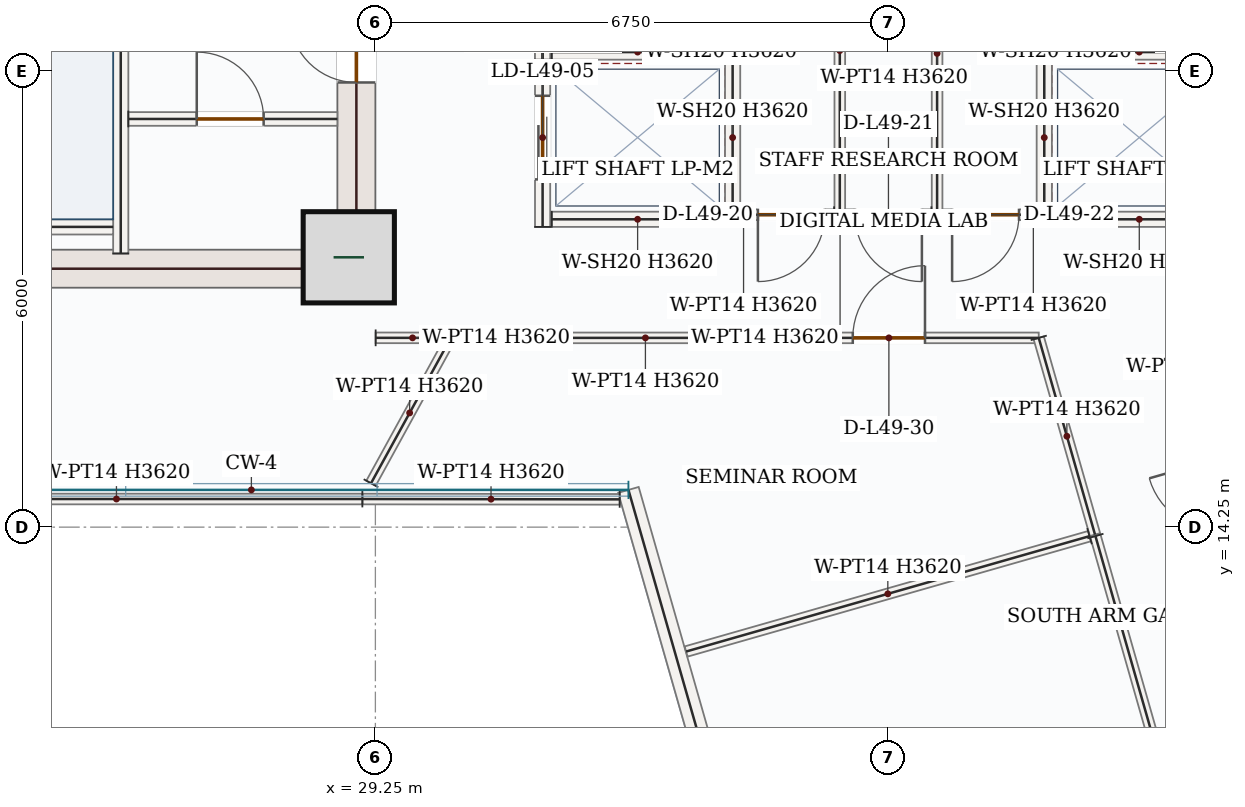
"""IFC4 building model, lengths in metres.
Left out: names, types, materials, properties, quantities, classifications, styles, units other than length and angle.
Written with IfcOpenShell. Run it as: python <this file> out.ifc"""

import sys

from ifc_helpers import new_model, si_unit, direction, frame, frame_2d, origin, origin_2d, place, context, subcontext, project, spatial, rectangle, extrude, source, transform, mapped, element, fill, save


model = new_model("IFC4")
c1 = context("Model", 3, precision=1e-05, world=origin(), true_north=direction((0.0, 1.0)))
c2 = subcontext(c1, "Body", "Model", "MODEL_VIEW")
j1 = project(units=[si_unit("LENGTHUNIT", "METRE"), si_unit("PLANEANGLEUNIT", "RADIAN")], contexts=[c1])
p1 = place(None, origin())
s1 = spatial("IfcSite", under=j1, at=p1, CompositionType="ELEMENT")
p2 = place(p1, origin())
s2 = spatial("IfcBuilding", under=s1, at=p2, CompositionType="ELEMENT")
p3 = place(p2, frame((0.0, 0.0, 209.7)))
s3 = spatial("IfcBuildingStorey", under=s2, at=p3, CompositionType="ELEMENT", Elevation=209.7)
p4 = place(p3, frame((29.0, 17.4, 0.0), z_axis=(0.0, 0.0, 1.0), x_axis=(0.0, 1.0, 0.0)))
e1 = element("IfcWall", 1, at=p4, inside=s3, PredefinedType="SHEAR", context=c2, shape_type="SweptSolid", body=[
    extrude(rectangle(XDim=8.55, YDim=0.5, at=frame_2d((4.275, 0.0))), origin(), (0.0, 0.0, 1.0), 3.62),
])
p5 = place(p4, frame((6.65, 0.0, 0.0)))
e2 = element("IfcOpeningElement", 2, at=p5, cuts=e1, PredefinedType="OPENING", context=c2, shape_type="SweptSolid", body=[
    extrude(rectangle(XDim=1.1, YDim=2.2, at=frame_2d((0.55, 1.1))), frame((0.0, 0.26, 0.0), z_axis=(0.0, -1.0, 0.0), x_axis=(1.0, 0.0, 0.0)), (0.0, 0.0, 1.0), 0.52),
])
p6 = place(p4, frame((2.7, 0.0, 0.0)))
e3 = element("IfcOpeningElement", 3, at=p6, cuts=e1, PredefinedType="OPENING", context=c2, shape_type="SweptSolid", body=[
    extrude(rectangle(XDim=0.88, YDim=2.1, at=frame_2d((0.44, 1.05))), frame((0.0, 0.26, 0.0), z_axis=(0.0, -1.0, 0.0), x_axis=(1.0, 0.0, 0.0)), (0.0, 0.0, 1.0), 0.52),
])
p7 = place(p4, frame((4.6, 0.0, 0.0)))
e4 = element("IfcOpeningElement", 4, at=p7, cuts=e1, PredefinedType="OPENING", context=c2, shape_type="SweptSolid", body=[
    extrude(rectangle(XDim=0.88, YDim=2.1, at=frame_2d((0.44, 1.05))), frame((0.0, 0.26, 0.0), z_axis=(0.0, -1.0, 0.0), x_axis=(1.0, 0.0, 0.0)), (0.0, 0.0, 1.0), 0.52),
])
m1 = source(origin(), c2, "Body", "SweptSolid", [
    extrude(rectangle(XDim=7.0, YDim=0.5, at=frame_2d((3.5, 0.0))), origin(), (0.0, 0.0, 1.0), 3.62),
])
p8 = place(p3, frame((21.75, 17.65, 0.0), z_axis=(0.0, 0.0, 1.0), x_axis=(1.0, 0.0, 0.0)))
e5 = element("IfcWall", 5, at=p8, inside=s3, PredefinedType="SHEAR", context=c2, shape_type="MappedRepresentation", body=[
    mapped(m1, transform((0.0, 0.0, 0.0), x_axis=(1.0, 0.0, 0.0), y_axis=(0.0, 1.0, 0.0), z_axis=(0.0, 0.0, 1.0), scale=1.0)),
])
m2 = source(origin(), c2, "Body", "SweptSolid", [
    extrude(rectangle(XDim=1.2, YDim=1.2, at=origin_2d()), origin(), (0.0, 0.0, 1.0), 3.9),
])
p9 = place(p3, frame((28.9, 17.8, 0.0), z_axis=(0.0, 0.0, 1.0), x_axis=(1.0, 0.0, 0.0)))
e6 = element("IfcColumn", 6, at=p9, inside=s3, PredefinedType="COLUMN", context=c2, shape_type="MappedRepresentation", body=[
    mapped(m2, transform((0.0, 0.0, 0.0), x_axis=(1.0, 0.0, 0.0), y_axis=(0.0, 1.0, 0.0), z_axis=(0.0, 0.0, 1.0), scale=1.0)),
])
p10 = place(p3, frame((34.92, 6.555, 0.0), z_axis=(0.0, 0.0, 1.0), x_axis=(-0.27496352843, 0.961454657295, 0.0)))
e7 = element("IfcWall", 7, at=p10, inside=s3, PredefinedType="SOLIDWALL", context=c2, shape_type="SweptSolid", body=[
    extrude(rectangle(XDim=8.513, YDim=0.28, at=frame_2d((4.257, 0.0))), origin(), (0.0, 0.0, 1.0), 3.62),
])
p11 = place(p10, frame((3.357, 0.0, 0.85)))
e8 = element("IfcOpeningElement", 8, at=p11, cuts=e7, PredefinedType="OPENING", context=c2, shape_type="SweptSolid", body=[
    extrude(rectangle(XDim=1.8, YDim=1.75, at=frame_2d((0.9, 0.875))), frame((0.0, 0.15, 0.0), z_axis=(0.0, -1.0, 0.0), x_axis=(1.0, 0.0, 0.0)), (0.0, 0.0, 1.0), 0.3),
])
p12 = place(p3, frame((25.9, 17.85, 0.0), z_axis=(0.0, 0.0, 1.0), x_axis=(0.0, 1.0, 0.0)))
e9 = element("IfcWall", 9, at=p12, inside=s3, PredefinedType="SOLIDWALL", context=c2, shape_type="SweptSolid", body=[
    extrude(rectangle(XDim=8.0, YDim=0.2, at=frame_2d((4.0, 0.0))), origin(), (0.0, 0.0, 1.0), 3.62),
])
p13 = place(p12, frame((6.3, 0.0, 0.0)))
e10 = element("IfcOpeningElement", 10, at=p13, cuts=e9, PredefinedType="OPENING", context=c2, shape_type="SweptSolid", body=[
    extrude(rectangle(XDim=1.05, YDim=2.15, at=frame_2d((0.525, 1.075))), frame((0.0, 0.11, 0.0), z_axis=(0.0, -1.0, 0.0), x_axis=(1.0, 0.0, 0.0)), (0.0, 0.0, 1.0), 0.22),
])
m3 = source(origin(), c2, "Body", "SweptSolid", [
    extrude(rectangle(XDim=3.25, YDim=0.2, at=frame_2d((1.625, 0.0))), origin(), (0.0, 0.0, 1.0), 3.62),
])
p14 = place(p3, frame((22.55, 18.2, 0.0), z_axis=(0.0, 0.0, 1.0), x_axis=(1.0, 0.0, 0.0)))
e11 = element("IfcWall", 11, at=p14, inside=s3, PredefinedType="SOLIDWALL", context=c2, shape_type="MappedRepresentation", body=[
    mapped(m3, transform((0.0, 0.0, 0.0), x_axis=(1.0, 0.0, 0.0), y_axis=(0.0, 1.0, 0.0), z_axis=(0.0, 0.0, 1.0), scale=1.0)),
])
p15 = place(p3, frame((26.0, 19.62, 0.0), z_axis=(0.0, 0.0, 1.0), x_axis=(1.0, 0.0, 0.0)))
e12 = element("IfcWall", 12, at=p15, inside=s3, PredefinedType="PARTITIONING", context=c2, shape_type="SweptSolid", body=[
    extrude(rectangle(XDim=2.75, YDim=0.18, at=frame_2d((1.375, 0.0))), origin(), (0.0, 0.0, 1.0), 3.62),
])
p16 = place(p15, frame((0.9, 0.0, 0.0)))
e13 = element("IfcOpeningElement", 13, at=p16, cuts=e12, PredefinedType="OPENING", context=c2, shape_type="SweptSolid", body=[
    extrude(rectangle(XDim=0.88, YDim=2.1, at=frame_2d((0.44, 1.05))), frame((0.0, 0.1, 0.0), z_axis=(0.0, -1.0, 0.0), x_axis=(1.0, 0.0, 0.0)), (0.0, 0.0, 1.0), 0.2),
])
p17 = place(p3, frame((31.45, 20.4, 0.0), z_axis=(0.0, 0.0, 1.0), x_axis=(0.0, 1.0, 0.0)))
e14 = element("IfcWall", 14, at=p17, inside=s3, PredefinedType="SOLIDWALL", context=c2, shape_type="SweptSolid", body=[
    extrude(rectangle(XDim=2.35, YDim=0.2, at=frame_2d((1.175, 0.0))), origin(), (0.0, 0.0, 1.0), 3.62),
])
p18 = place(p17, frame((0.625, 0.0, 0.0)))
e15 = element("IfcOpeningElement", 15, at=p18, cuts=e14, PredefinedType="OPENING", context=c2, shape_type="SweptSolid", body=[
    extrude(rectangle(XDim=1.1, YDim=2.15, at=frame_2d((0.55, 1.075))), frame((0.0, 0.11, 0.0), z_axis=(0.0, -1.0, 0.0), x_axis=(1.0, 0.0, 0.0)), (0.0, 0.0, 1.0), 0.22),
])
m4 = source(origin(), c2, "Body", "SweptSolid", [
    extrude(rectangle(XDim=2.35, YDim=0.2, at=frame_2d((1.175, 0.0))), origin(), (0.0, 0.0, 1.0), 3.62),
])
p19 = place(p3, frame((33.95, 20.4, 0.0), z_axis=(0.0, 0.0, 1.0), x_axis=(0.0, 1.0, 0.0)))
e16 = element("IfcWall", 16, at=p19, inside=s3, PredefinedType="SOLIDWALL", context=c2, shape_type="MappedRepresentation", body=[
    mapped(m4, transform((0.0, 0.0, 0.0), x_axis=(1.0, 0.0, 0.0), y_axis=(0.0, 1.0, 0.0), z_axis=(0.0, 0.0, 1.0), scale=1.0)),
])
m5 = source(origin(), c2, "Body", "SweptSolid", [
    extrude(rectangle(XDim=2.26, YDim=0.2, at=frame_2d((1.13, 0.0))), origin(), (0.0, 0.0, 1.0), 3.62),
])
p20 = place(p3, frame((31.57, 20.5, 0.0), z_axis=(0.0, 0.0, 1.0), x_axis=(1.0, 0.0, 0.0)))
e17 = element("IfcWall", 17, at=p20, inside=s3, PredefinedType="SOLIDWALL", context=c2, shape_type="MappedRepresentation", body=[
    mapped(m5, transform((0.0, 0.0, 0.0), x_axis=(1.0, 0.0, 0.0), y_axis=(0.0, 1.0, 0.0), z_axis=(0.0, 0.0, 1.0), scale=1.0)),
])
p21 = place(p3, frame((31.45, 18.2, 0.0), z_axis=(0.0, 0.0, 1.0), x_axis=(0.0, 1.0, 0.0)))
e18 = element("IfcWall", 18, at=p21, inside=s3, PredefinedType="SOLIDWALL", context=c2, shape_type="SweptSolid", body=[
    extrude(rectangle(XDim=2.35, YDim=0.2, at=frame_2d((1.175, 0.0))), origin(), (0.0, 0.0, 1.0), 3.62),
])
p22 = place(p21, frame((0.625, 0.0, 0.0)))
e19 = element("IfcOpeningElement", 19, at=p22, cuts=e18, PredefinedType="OPENING", context=c2, shape_type="SweptSolid", body=[
    extrude(rectangle(XDim=1.1, YDim=2.15, at=frame_2d((0.55, 1.075))), frame((0.0, 0.11, 0.0), z_axis=(0.0, -1.0, 0.0), x_axis=(1.0, 0.0, 0.0)), (0.0, 0.0, 1.0), 0.22),
])
p23 = place(p3, frame((33.95, 18.2, 0.0), z_axis=(0.0, 0.0, 1.0), x_axis=(0.0, 1.0, 0.0)))
e20 = element("IfcWall", 20, at=p23, inside=s3, PredefinedType="SOLIDWALL", context=c2, shape_type="MappedRepresentation", body=[
    mapped(m4, transform((0.0, 0.0, 0.0), x_axis=(1.0, 0.0, 0.0), y_axis=(0.0, 1.0, 0.0), z_axis=(0.0, 0.0, 1.0), scale=1.0)),
])
p24 = place(p3, frame((31.57, 18.3, 0.0), z_axis=(0.0, 0.0, 1.0), x_axis=(1.0, 0.0, 0.0)))
e21 = element("IfcWall", 21, at=p24, inside=s3, PredefinedType="SOLIDWALL", context=c2, shape_type="MappedRepresentation", body=[
    mapped(m5, transform((0.0, 0.0, 0.0), x_axis=(1.0, 0.0, 0.0), y_axis=(0.0, 1.0, 0.0), z_axis=(0.0, 0.0, 1.0), scale=1.0)),
])
p25 = place(p3, frame((38.05, 20.4, 0.0), z_axis=(0.0, 0.0, 1.0), x_axis=(0.0, 1.0, 0.0)))
e22 = element("IfcWall", 22, at=p25, inside=s3, PredefinedType="SOLIDWALL", context=c2, shape_type="MappedRepresentation", body=[
    mapped(m4, transform((0.0, 0.0, 0.0), x_axis=(1.0, 0.0, 0.0), y_axis=(0.0, 1.0, 0.0), z_axis=(0.0, 0.0, 1.0), scale=1.0)),
])
p26 = place(p3, frame((38.17, 20.5, 0.0), z_axis=(0.0, 0.0, 1.0), x_axis=(1.0, 0.0, 0.0)))
e23 = element("IfcWall", 23, at=p26, inside=s3, PredefinedType="SOLIDWALL", context=c2, shape_type="MappedRepresentation", body=[
    mapped(m5, transform((0.0, 0.0, 0.0), x_axis=(1.0, 0.0, 0.0), y_axis=(0.0, 1.0, 0.0), z_axis=(0.0, 0.0, 1.0), scale=1.0)),
])
p27 = place(p3, frame((38.05, 18.2, 0.0), z_axis=(0.0, 0.0, 1.0), x_axis=(0.0, 1.0, 0.0)))
e24 = element("IfcWall", 24, at=p27, inside=s3, PredefinedType="SOLIDWALL", context=c2, shape_type="MappedRepresentation", body=[
    mapped(m4, transform((0.0, 0.0, 0.0), x_axis=(1.0, 0.0, 0.0), y_axis=(0.0, 1.0, 0.0), z_axis=(0.0, 0.0, 1.0), scale=1.0)),
])
p28 = place(p3, frame((38.17, 18.3, 0.0), z_axis=(0.0, 0.0, 1.0), x_axis=(1.0, 0.0, 0.0)))
e25 = element("IfcWall", 25, at=p28, inside=s3, PredefinedType="SOLIDWALL", context=c2, shape_type="MappedRepresentation", body=[
    mapped(m5, transform((0.0, 0.0, 0.0), x_axis=(1.0, 0.0, 0.0), y_axis=(0.0, 1.0, 0.0), z_axis=(0.0, 0.0, 1.0), scale=1.0)),
])
m6 = source(origin(), c2, "Body", "SweptSolid", [
    extrude(rectangle(XDim=4.32, YDim=0.14, at=frame_2d((2.16, 0.0))), origin(), (0.0, 0.0, 1.0), 3.62),
])
p29 = place(p3, frame((35.36, 18.36, 0.0), z_axis=(0.0, 0.0, 1.0), x_axis=(0.0, 1.0, 0.0)))
e26 = element("IfcWall", 26, at=p29, inside=s3, PredefinedType="PARTITIONING", context=c2, shape_type="MappedRepresentation", body=[
    mapped(m6, transform((0.0, 0.0, 0.0), x_axis=(1.0, 0.0, 0.0), y_axis=(0.0, 1.0, 0.0), z_axis=(0.0, 0.0, 1.0), scale=1.0)),
])
m7 = source(origin(), c2, "Body", "SweptSolid", [
    extrude(rectangle(XDim=4.245, YDim=0.14, at=frame_2d((2.123, 0.0))), origin(), (0.0, 0.0, 1.0), 3.62),
])
p30 = place(p3, frame((36.64, 22.605, 0.0), z_axis=(0.0, 0.0, 1.0), x_axis=(0.0, -1.0, 0.0)))
e27 = element("IfcWall", 27, at=p30, inside=s3, PredefinedType="PARTITIONING", context=c2, shape_type="MappedRepresentation", body=[
    mapped(m7, transform((0.0, 0.0, 0.0), x_axis=(1.0, 0.0, 0.0), y_axis=(0.0, 1.0, 0.0), z_axis=(0.0, 0.0, 1.0), scale=1.0)),
])
p31 = place(p3, frame((36.565, 18.36, 0.0), z_axis=(0.0, 0.0, 1.0), x_axis=(-1.0, 0.0, 0.0)))
e28 = element("IfcWall", 28, at=p31, inside=s3, PredefinedType="PARTITIONING", context=c2, shape_type="SweptSolid", body=[
    extrude(rectangle(XDim=1.13, YDim=0.14, at=frame_2d((0.565, 0.0))), origin(), (0.0, 0.0, 1.0), 3.62),
])
p32 = place(p31, frame((0.125, 0.0, 0.0)))
e29 = element("IfcOpeningElement", 29, at=p32, cuts=e28, PredefinedType="OPENING", context=c2, shape_type="SweptSolid", body=[
    extrude(rectangle(XDim=0.88, YDim=2.1, at=frame_2d((0.44, 1.05))), frame((0.0, 0.08, 0.0), z_axis=(0.0, -1.0, 0.0), x_axis=(1.0, 0.0, 0.0)), (0.0, 0.0, 1.0), 0.16),
])
p33 = place(p3, frame((35.285, 18.36, 0.0), z_axis=(0.0, 0.0, 1.0), x_axis=(-1.0, 0.0, 0.0)))
e30 = element("IfcWall", 30, at=p33, inside=s3, PredefinedType="PARTITIONING", context=c2, shape_type="SweptSolid", body=[
    extrude(rectangle(XDim=1.23, YDim=0.14, at=frame_2d((0.615, 0.0))), origin(), (0.0, 0.0, 1.0), 3.62),
])
p34 = place(p33, frame((0.123, 0.0, 0.0)))
e31 = element("IfcOpeningElement", 31, at=p34, cuts=e30, PredefinedType="OPENING", context=c2, shape_type="SweptSolid", body=[
    extrude(rectangle(XDim=0.88, YDim=2.1, at=frame_2d((0.44, 1.05))), frame((0.0, 0.08, 0.0), z_axis=(0.0, -1.0, 0.0), x_axis=(1.0, 0.0, 0.0)), (0.0, 0.0, 1.0), 0.16),
])
p35 = place(p3, frame((37.945, 18.36, 0.0), z_axis=(0.0, 0.0, 1.0), x_axis=(-1.0, 0.0, 0.0)))
e32 = element("IfcWall", 32, at=p35, inside=s3, PredefinedType="PARTITIONING", context=c2, shape_type="SweptSolid", body=[
    extrude(rectangle(XDim=1.23, YDim=0.14, at=frame_2d((0.615, 0.0))), origin(), (0.0, 0.0, 1.0), 3.62),
])
p36 = place(p35, frame((0.228, 0.0, 0.0)))
e33 = element("IfcOpeningElement", 33, at=p36, cuts=e32, PredefinedType="OPENING", context=c2, shape_type="SweptSolid", body=[
    extrude(rectangle(XDim=0.88, YDim=2.1, at=frame_2d((0.44, 1.05))), frame((0.0, 0.08, 0.0), z_axis=(0.0, -1.0, 0.0), x_axis=(1.0, 0.0, 0.0)), (0.0, 0.0, 1.0), 0.16),
])
p37 = place(p3, frame((30.225, 16.74, 0.0), z_axis=(0.0, 0.0, 1.0), x_axis=(1.0, 0.0, 0.0)))
e34 = element("IfcWall", 34, at=p37, inside=s3, PredefinedType="PARTITIONING", context=c2, shape_type="SweptSolid", body=[
    extrude(rectangle(XDim=7.753, YDim=0.14, at=frame_2d((3.876, 0.0))), origin(), (0.0, 0.0, 1.0), 3.62),
])
p38 = place(p37, frame((5.306, 0.0, 0.0)))
e35 = element("IfcOpeningElement", 35, at=p38, cuts=e34, PredefinedType="OPENING", context=c2, shape_type="SweptSolid", body=[
    extrude(rectangle(XDim=0.95, YDim=2.15, at=frame_2d((0.475, 1.075))), frame((0.0, 0.08, 0.0), z_axis=(0.0, -1.0, 0.0), x_axis=(1.0, 0.0, 0.0)), (0.0, 0.0, 1.0), 0.16),
])
m8 = source(origin(), c2, "Body", "SweptSolid", [
    extrude(rectangle(XDim=2.692, YDim=0.14, at=frame_2d((1.346, 0.0))), origin(), (0.0, 0.0, 1.0), 3.62),
])
p39 = place(p3, frame((37.977, 16.74, 0.0), z_axis=(0.0, 0.0, 1.0), x_axis=(0.27500862401, -0.961441759401, 0.0)))
e36 = element("IfcWall", 36, at=p39, inside=s3, PredefinedType="PARTITIONING", context=c2, shape_type="MappedRepresentation", body=[
    mapped(m8, transform((0.0, 0.0, 0.0), x_axis=(1.0, 0.0, 0.0), y_axis=(0.0, 1.0, 0.0), z_axis=(0.0, 0.0, 1.0), scale=1.0)),
])
m9 = source(origin(), c2, "Body", "SweptSolid", [
    extrude(rectangle(XDim=5.52, YDim=0.14, at=frame_2d((2.76, 0.0))), origin(), (0.0, 0.0, 1.0), 3.62),
])
p40 = place(p3, frame((38.646, 14.131, 0.0), z_axis=(0.0, 0.0, 1.0), x_axis=(-0.961455490798, -0.274960613933, 0.0)))
e37 = element("IfcWall", 37, at=p40, inside=s3, PredefinedType="PARTITIONING", context=c2, shape_type="MappedRepresentation", body=[
    mapped(m9, transform((0.0, 0.0, 0.0), x_axis=(1.0, 0.0, 0.0), y_axis=(0.0, 1.0, 0.0), z_axis=(0.0, 0.0, 1.0), scale=1.0)),
])
m10 = source(origin(), c2, "Body", "SweptSolid", [
    extrude(rectangle(XDim=3.385, YDim=0.14, at=frame_2d((1.693, 0.0))), origin(), (0.0, 0.0, 1.0), 3.62),
])
p41 = place(p3, frame((32.464, 14.615, 0.0), z_axis=(0.0, 0.0, 1.0), x_axis=(-0.999999061333, 0.001370158085, 0.0)))
e38 = element("IfcWall", 38, at=p41, inside=s3, PredefinedType="PARTITIONING", context=c2, shape_type="MappedRepresentation", body=[
    mapped(m10, transform((0.0, 0.0, 0.0), x_axis=(1.0, 0.0, 0.0), y_axis=(0.0, 1.0, 0.0), z_axis=(0.0, 0.0, 1.0), scale=1.0)),
])
m11 = source(origin(), c2, "Body", "SweptSolid", [
    extrude(rectangle(XDim=2.111, YDim=0.14, at=frame_2d((1.056, 0.0))), origin(), (0.0, 0.0, 1.0), 3.62),
])
p42 = place(p3, frame((29.193, 14.827, 0.0), z_axis=(0.0, 0.0, 1.0), x_axis=(0.481297142313, 0.876557505702, 0.0)))
e39 = element("IfcWall", 39, at=p42, inside=s3, PredefinedType="PARTITIONING", context=c2, shape_type="MappedRepresentation", body=[
    mapped(m11, transform((0.0, 0.0, 0.0), x_axis=(1.0, 0.0, 0.0), y_axis=(0.0, 1.0, 0.0), z_axis=(0.0, 0.0, 1.0), scale=1.0)),
])
p43 = place(p3, frame((38.723, 14.133, 0.0), z_axis=(0.0, 0.0, 1.0), x_axis=(0.274985856522, -0.96144827147, 0.0)))
e40 = element("IfcWall", 40, at=p43, inside=s3, PredefinedType="PARTITIONING", context=c2, shape_type="SweptSolid", body=[
    extrude(rectangle(XDim=7.795, YDim=0.14, at=frame_2d((3.897, 0.0))), origin(), (0.0, 0.0, 1.0), 3.62),
])
p44 = place(p43, frame((3.423, 0.0, 0.0)))
e41 = element("IfcOpeningElement", 41, at=p44, cuts=e40, PredefinedType="OPENING", context=c2, shape_type="SweptSolid", body=[
    extrude(rectangle(XDim=0.95, YDim=2.15, at=frame_2d((0.475, 1.075))), frame((0.0, 0.08, 0.0), z_axis=(0.0, -1.0, 0.0), x_axis=(1.0, 0.0, 0.0)), (0.0, 0.0, 1.0), 0.16),
])
m12 = source(origin(), c2, "Body", "SweptSolid", [
    extrude(rectangle(XDim=0.971, YDim=0.14, at=frame_2d((0.486, 0.0))), origin(), (0.0, 0.0, 1.0), 3.62),
])
p45 = place(p3, frame((29.253, 16.74, 0.0), z_axis=(0.0, 0.0, 1.0), x_axis=(0.999999873614, -0.000502765145, 0.0)))
e42 = element("IfcWall", 42, at=p45, inside=s3, PredefinedType="PARTITIONING", context=c2, shape_type="MappedRepresentation", body=[
    mapped(m12, transform((0.0, 0.0, 0.0), x_axis=(1.0, 0.0, 0.0), y_axis=(0.0, 1.0, 0.0), z_axis=(0.0, 0.0, 1.0), scale=1.0)),
])
m13 = source(origin(), c2, "Body", "SweptSolid", [
    extrude(rectangle(XDim=6.47, YDim=0.14, at=frame_2d((3.235, 0.0))), origin(), (0.0, 0.0, 1.0), 3.62),
])
p46 = place(p3, frame((29.079, 14.62, 0.0), z_axis=(0.0, 0.0, 1.0), x_axis=(-1.0, 0.0, 0.0)))
e43 = element("IfcWall", 43, at=p46, inside=s3, PredefinedType="PARTITIONING", context=c2, shape_type="MappedRepresentation", body=[
    mapped(m13, transform((0.0, 0.0, 0.0), x_axis=(1.0, 0.0, 0.0), y_axis=(0.0, 1.0, 0.0), z_axis=(0.0, 0.0, 1.0), scale=1.0)),
])
m14 = source(origin(), c2, "Body", "SweptSolid", [
    extrude(rectangle(XDim=0.88, YDim=2.1, at=frame_2d((0.44, 1.05))), frame((0.0, 0.025, 0.0), z_axis=(0.0, -1.0, 0.0), x_axis=(1.0, 0.0, 0.0)), (0.0, 0.0, 1.0), 0.05),
])
p47 = place(p16, origin())
e44 = element("IfcDoor", 44, at=p47, inside=s3, OperationType="SINGLE_SWING_LEFT", PredefinedType="DOOR", context=c2, shape_type="MappedRepresentation", body=[
    mapped(m14, transform((0.0, 0.0, 0.0), x_axis=(1.0, 0.0, 0.0), y_axis=(0.0, 1.0, 0.0), z_axis=(0.0, 0.0, 1.0), scale=1.0)),
])
fill(e13, e44)
p48 = place(p6, origin())
e45 = element("IfcDoor", 45, at=p48, inside=s3, OperationType="SINGLE_SWING_RIGHT", PredefinedType="DOOR", context=c2, shape_type="MappedRepresentation", body=[
    mapped(m14, transform((0.0, 0.0, 0.0), x_axis=(1.0, 0.0, 0.0), y_axis=(0.0, 1.0, 0.0), z_axis=(0.0, 0.0, 1.0), scale=1.0)),
])
fill(e3, e45)
m15 = source(origin(), c2, "Body", "SweptSolid", [
    extrude(rectangle(XDim=1.1, YDim=2.15, at=frame_2d((0.55, 1.075))), frame((0.0, 0.025, 0.0), z_axis=(0.0, -1.0, 0.0), x_axis=(1.0, 0.0, 0.0)), (0.0, 0.0, 1.0), 0.05),
])
p49 = place(p22, origin())
e46 = element("IfcDoor", 46, at=p49, inside=s3, OperationType="DOUBLE_DOOR_SLIDING", PredefinedType="DOOR", context=c2, shape_type="MappedRepresentation", body=[
    mapped(m15, transform((0.0, 0.0, 0.0), x_axis=(1.0, 0.0, 0.0), y_axis=(0.0, 1.0, 0.0), z_axis=(0.0, 0.0, 1.0), scale=1.0)),
])
fill(e19, e46)
p50 = place(p34, origin())
e47 = element("IfcDoor", 47, at=p50, inside=s3, OperationType="SINGLE_SWING_RIGHT", PredefinedType="DOOR", context=c2, shape_type="MappedRepresentation", body=[
    mapped(m14, transform((0.0, 0.0, 0.0), x_axis=(1.0, 0.0, 0.0), y_axis=(0.0, 1.0, 0.0), z_axis=(0.0, 0.0, 1.0), scale=1.0)),
])
fill(e31, e47)
p51 = place(p32, origin())
e48 = element("IfcDoor", 48, at=p51, inside=s3, OperationType="SINGLE_SWING_LEFT", PredefinedType="DOOR", context=c2, shape_type="MappedRepresentation", body=[
    mapped(m14, transform((0.0, 0.0, 0.0), x_axis=(1.0, 0.0, 0.0), y_axis=(0.0, 1.0, 0.0), z_axis=(0.0, 0.0, 1.0), scale=1.0)),
])
fill(e29, e48)
p52 = place(p36, origin())
e49 = element("IfcDoor", 49, at=p52, inside=s3, OperationType="SINGLE_SWING_RIGHT", PredefinedType="DOOR", context=c2, shape_type="MappedRepresentation", body=[
    mapped(m14, transform((0.0, 0.0, 0.0), x_axis=(1.0, 0.0, 0.0), y_axis=(0.0, 1.0, 0.0), z_axis=(0.0, 0.0, 1.0), scale=1.0)),
])
fill(e33, e49)
m16 = source(origin(), c2, "Body", "SweptSolid", [
    extrude(rectangle(XDim=0.95, YDim=2.15, at=frame_2d((0.475, 1.075))), frame((0.0, 0.025, 0.0), z_axis=(0.0, -1.0, 0.0), x_axis=(1.0, 0.0, 0.0)), (0.0, 0.0, 1.0), 0.05),
])
p53 = place(p38, origin())
e50 = element("IfcDoor", 50, at=p53, inside=s3, OperationType="SINGLE_SWING_RIGHT", PredefinedType="DOOR", context=c2, shape_type="MappedRepresentation", body=[
    mapped(m16, transform((0.0, 0.0, 0.0), x_axis=(1.0, 0.0, 0.0), y_axis=(0.0, 1.0, 0.0), z_axis=(0.0, 0.0, 1.0), scale=1.0)),
])
fill(e35, e50)
save(model, sys.argv[1])
